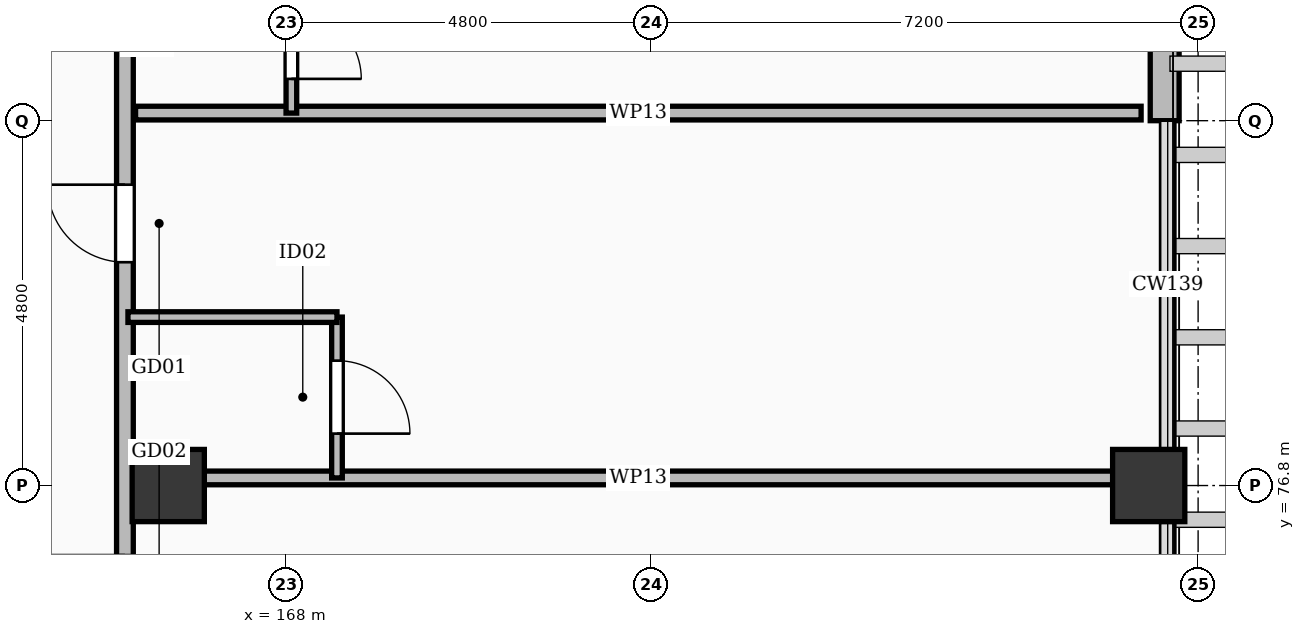
"""IFC4 building model, lengths in metres.
Left out: names, types, materials, properties, quantities, classifications, styles, units other than length and angle.
Written with IfcOpenShell. Run it as: python <this file> out.ifc"""

import sys

from ifc_helpers import new_model, si_unit, direction, frame, frame_2d, origin, origin_2d, place, context, subcontext, project, spatial, rectangle, extrude, element, fill, save


model = new_model("IFC4")
c1 = context("Model", 3, precision=1e-05, world=origin(), true_north=direction((0.0, 1.0)))
c2 = subcontext(c1, "Body", "Model", "MODEL_VIEW")
j1 = project(units=[si_unit("LENGTHUNIT", "METRE"), si_unit("PLANEANGLEUNIT", "RADIAN")], contexts=[c1])
p1 = place(None, origin())
s1 = spatial("IfcSite", under=j1, at=p1, CompositionType="ELEMENT")
p2 = place(p1, origin())
s2 = spatial("IfcBuilding", under=s1, at=p2, CompositionType="ELEMENT")
p3 = place(p2, frame((0.0, 0.0, 11.4)))
s3 = spatial("IfcBuildingStorey", under=s2, at=p3, CompositionType="ELEMENT", Elevation=11.4)
for number, where, z_axis, x_axis in (
    (1, (166.45, 76.8, 0.0), (0.0, 0.0, 1.0), (1.0, 0.0, 0.0)),
    (2, (179.35, 76.8, 0.0), (0.0, 0.0, 1.0), (1.0, 0.0, 0.0)),
):
    element("IfcColumn", number, at=place(p3, frame(where, z_axis=z_axis, x_axis=x_axis)), inside=s3, PredefinedType="COLUMN", context=c2, shape_type="SweptSolid", body=[
        extrude(rectangle(XDim=0.95, YDim=0.95, at=origin_2d()), origin(), (0.0, 0.0, 1.0), 4.8),
    ])
p4 = place(p3, frame((179.56, 85.95, 0.0), z_axis=(0.0, 0.0, 1.0), x_axis=(0.0, -1.0, 0.0)))
e3 = element("IfcWall", 3, at=p4, inside=s3, PredefinedType="SOLIDWALL", context=c2, shape_type="SweptSolid", body=[
    extrude(rectangle(XDim=4.35, YDim=0.38, at=frame_2d((2.175, 0.0))), origin(), (0.0, 0.0, 1.0), 3.662),
])
p5 = place(p4, frame((1.54, 0.0, 0.55)))
e4 = element("IfcOpeningElement", 4, at=p5, cuts=e3, PredefinedType="OPENING", context=c2, shape_type="SweptSolid", body=[
    extrude(rectangle(XDim=1.2, YDim=1.72, at=frame_2d((0.6, 0.86))), frame((0.0, 0.202, 0.0), z_axis=(0.0, -1.0, 0.0), x_axis=(1.0, 0.0, 0.0)), (0.0, 0.0, 1.0), 0.404),
])
p6 = place(p3, frame((165.88, 65.4, 0.0), z_axis=(0.0, 0.0, 1.0), x_axis=(0.0, 1.0, 0.0)))
e5 = element("IfcWall", 5, at=p6, inside=s3, PredefinedType="PARTITIONING", context=c2, shape_type="SweptSolid", body=[
    extrude(rectangle(XDim=60.25, YDim=0.22, at=frame_2d((30.125, 0.0))), origin(), (0.0, 0.0, 1.0), 3.662),
])
p7 = place(p6, frame((4.738, 0.0, 0.0)))
e6 = element("IfcOpeningElement", 6, at=p7, cuts=e5, PredefinedType="OPENING", context=c2, shape_type="SweptSolid", body=[
    extrude(rectangle(XDim=1.05, YDim=2.18, at=frame_2d((0.525, 1.09))), frame((0.0, 0.122, 0.0), z_axis=(0.0, -1.0, 0.0), x_axis=(1.0, 0.0, 0.0)), (0.0, 0.0, 1.0), 0.244),
])
p8 = place(p6, frame((9.405, 0.0, 0.0)))
e7 = element("IfcOpeningElement", 7, at=p8, cuts=e5, PredefinedType="OPENING", context=c2, shape_type="SweptSolid", body=[
    extrude(rectangle(XDim=1.08, YDim=2.25, at=frame_2d((0.54, 1.125))), frame((0.0, 0.122, 0.0), z_axis=(0.0, -1.0, 0.0), x_axis=(1.0, 0.0, 0.0)), (0.0, 0.0, 1.0), 0.244),
])
p9 = place(p6, frame((14.338, 0.0, 0.0)))
e8 = element("IfcOpeningElement", 8, at=p9, cuts=e5, PredefinedType="OPENING", context=c2, shape_type="SweptSolid", body=[
    extrude(rectangle(XDim=1.02, YDim=2.2, at=frame_2d((0.51, 1.1))), frame((0.0, 0.122, 0.0), z_axis=(0.0, -1.0, 0.0), x_axis=(1.0, 0.0, 0.0)), (0.0, 0.0, 1.0), 0.244),
])
p10 = place(p6, frame((18.655, 0.0, 0.0)))
e9 = element("IfcOpeningElement", 9, at=p10, cuts=e5, PredefinedType="OPENING", context=c2, shape_type="SweptSolid", body=[
    extrude(rectangle(XDim=1.5, YDim=2.3, at=frame_2d((0.75, 1.15))), frame((0.0, 0.122, 0.0), z_axis=(0.0, -1.0, 0.0), x_axis=(1.0, 0.0, 0.0)), (0.0, 0.0, 1.0), 0.244),
])
p11 = place(p6, frame((23.938, 0.0, 0.0)))
e10 = element("IfcOpeningElement", 10, at=p11, cuts=e5, PredefinedType="OPENING", context=c2, shape_type="SweptSolid", body=[
    extrude(rectangle(XDim=1.12, YDim=2.15, at=frame_2d((0.56, 1.075))), frame((0.0, 0.122, 0.0), z_axis=(0.0, -1.0, 0.0), x_axis=(1.0, 0.0, 0.0)), (0.0, 0.0, 1.0), 0.244),
])
p12 = place(p6, frame((28.605, 0.0, 0.0)))
e11 = element("IfcOpeningElement", 11, at=p12, cuts=e5, PredefinedType="OPENING", context=c2, shape_type="SweptSolid", body=[
    extrude(rectangle(XDim=1.28, YDim=2.16, at=frame_2d((0.64, 1.08))), frame((0.0, 0.122, 0.0), z_axis=(0.0, -1.0, 0.0), x_axis=(1.0, 0.0, 0.0)), (0.0, 0.0, 1.0), 0.244),
])
p13 = place(p6, frame((33.538, 0.0, 0.0)))
e12 = element("IfcOpeningElement", 12, at=p13, cuts=e5, PredefinedType="OPENING", context=c2, shape_type="SweptSolid", body=[
    extrude(rectangle(XDim=1.05, YDim=2.18, at=frame_2d((0.525, 1.09))), frame((0.0, 0.122, 0.0), z_axis=(0.0, -1.0, 0.0), x_axis=(1.0, 0.0, 0.0)), (0.0, 0.0, 1.0), 0.244),
])
p14 = place(p6, frame((38.205, 0.0, 0.0)))
e13 = element("IfcOpeningElement", 13, at=p14, cuts=e5, PredefinedType="OPENING", context=c2, shape_type="SweptSolid", body=[
    extrude(rectangle(XDim=1.08, YDim=2.25, at=frame_2d((0.54, 1.125))), frame((0.0, 0.122, 0.0), z_axis=(0.0, -1.0, 0.0), x_axis=(1.0, 0.0, 0.0)), (0.0, 0.0, 1.0), 0.244),
])
p15 = place(p6, frame((43.138, 0.0, 0.0)))
e14 = element("IfcOpeningElement", 14, at=p15, cuts=e5, PredefinedType="OPENING", context=c2, shape_type="SweptSolid", body=[
    extrude(rectangle(XDim=1.02, YDim=2.2, at=frame_2d((0.51, 1.1))), frame((0.0, 0.122, 0.0), z_axis=(0.0, -1.0, 0.0), x_axis=(1.0, 0.0, 0.0)), (0.0, 0.0, 1.0), 0.244),
])
p16 = place(p6, frame((47.455, 0.0, 0.0)))
e15 = element("IfcOpeningElement", 15, at=p16, cuts=e5, PredefinedType="OPENING", context=c2, shape_type="SweptSolid", body=[
    extrude(rectangle(XDim=1.5, YDim=2.3, at=frame_2d((0.75, 1.15))), frame((0.0, 0.122, 0.0), z_axis=(0.0, -1.0, 0.0), x_axis=(1.0, 0.0, 0.0)), (0.0, 0.0, 1.0), 0.244),
])
p17 = place(p6, frame((52.738, 0.0, 0.0)))
e16 = element("IfcOpeningElement", 16, at=p17, cuts=e5, PredefinedType="OPENING", context=c2, shape_type="SweptSolid", body=[
    extrude(rectangle(XDim=1.12, YDim=2.15, at=frame_2d((0.56, 1.075))), frame((0.0, 0.122, 0.0), z_axis=(0.0, -1.0, 0.0), x_axis=(1.0, 0.0, 0.0)), (0.0, 0.0, 1.0), 0.244),
])
p18 = place(p6, frame((57.405, 0.0, 0.0)))
e17 = element("IfcOpeningElement", 17, at=p18, cuts=e5, PredefinedType="OPENING", context=c2, shape_type="SweptSolid", body=[
    extrude(rectangle(XDim=1.28, YDim=2.16, at=frame_2d((0.64, 1.08))), frame((0.0, 0.122, 0.0), z_axis=(0.0, -1.0, 0.0), x_axis=(1.0, 0.0, 0.0)), (0.0, 0.0, 1.0), 0.244),
])
p19 = place(p3, frame((166.02, 76.9, 0.0), z_axis=(0.0, 0.0, 1.0), x_axis=(1.0, 0.0, 0.0)))
e18 = element("IfcWall", 18, at=p19, inside=s3, PredefinedType="PARTITIONING", context=c2, shape_type="SweptSolid", body=[
    extrude(rectangle(XDim=13.23, YDim=0.18, at=frame_2d((6.615, 0.0))), origin(), (0.0, 0.0, 1.0), 3.662),
])
p20 = place(p3, frame((168.67, 76.9, 0.0), z_axis=(0.0, 0.0, 1.0), x_axis=(0.0, 1.0, 0.0)))
e19 = element("IfcWall", 19, at=p20, inside=s3, PredefinedType="PARTITIONING", context=c2, shape_type="SweptSolid", body=[
    extrude(rectangle(XDim=2.116, YDim=0.14, at=frame_2d((1.058, 0.0))), origin(), (0.0, 0.0, 1.0), 3.692),
])
p21 = place(p20, frame((0.583, 0.0, 0.0)))
e20 = element("IfcOpeningElement", 20, at=p21, cuts=e19, PredefinedType="OPENING", context=c2, shape_type="SweptSolid", body=[
    extrude(rectangle(XDim=0.96, YDim=2.12, at=frame_2d((0.48, 1.06))), frame((0.0, 0.082, 0.0), z_axis=(0.0, -1.0, 0.0), x_axis=(1.0, 0.0, 0.0)), (0.0, 0.0, 1.0), 0.164),
])
p22 = place(p3, frame((165.92, 79.016, 0.0), z_axis=(0.0, 0.0, 1.0), x_axis=(1.0, 0.0, 0.0)))
e21 = element("IfcWall", 21, at=p22, inside=s3, PredefinedType="PARTITIONING", context=c2, shape_type="SweptSolid", body=[
    extrude(rectangle(XDim=2.75, YDim=0.14, at=frame_2d((1.375, 0.0))), origin(), (0.0, 0.0, 1.0), 3.692),
])
p23 = place(p3, frame((166.02, 81.7, 0.0), z_axis=(0.0, 0.0, 1.0), x_axis=(1.0, 0.0, 0.0)))
e22 = element("IfcWall", 22, at=p23, inside=s3, PredefinedType="PARTITIONING", context=c2, shape_type="SweptSolid", body=[
    extrude(rectangle(XDim=13.23, YDim=0.18, at=frame_2d((6.615, 0.0))), origin(), (0.0, 0.0, 1.0), 3.662),
])
p24 = place(p3, frame((168.07, 81.7, 0.0), z_axis=(0.0, 0.0, 1.0), x_axis=(0.0, 1.0, 0.0)))
e23 = element("IfcWall", 23, at=p24, inside=s3, PredefinedType="PARTITIONING", context=c2, shape_type="SweptSolid", body=[
    extrude(rectangle(XDim=1.85, YDim=0.14, at=frame_2d((0.925, 0.0))), origin(), (0.0, 0.0, 1.0), 4.42),
])
p25 = place(p24, frame((0.45, 0.0, 0.0)))
e24 = element("IfcOpeningElement", 24, at=p25, cuts=e23, PredefinedType="OPENING", context=c2, shape_type="SweptSolid", body=[
    extrude(rectangle(XDim=0.92, YDim=2.1, at=frame_2d((0.46, 1.05))), frame((0.0, 0.082, 0.0), z_axis=(0.0, -1.0, 0.0), x_axis=(1.0, 0.0, 0.0)), (0.0, 0.0, 1.0), 0.164),
])
p26 = place(p9, origin())
e25 = element("IfcDoor", 25, at=p26, inside=s3, OperationType="SINGLE_SWING_RIGHT", PredefinedType="DOOR", context=c2, shape_type="SweptSolid", body=[
    extrude(rectangle(XDim=1.02, YDim=2.2, at=frame_2d((0.51, 1.1))), frame((0.0, 0.025, 0.0), z_axis=(0.0, -1.0, 0.0), x_axis=(1.0, 0.0, 0.0)), (0.0, 0.0, 1.0), 0.05),
])
fill(e8, e25)
p27 = place(p21, frame((0.96, 0.0, 0.0), z_axis=(0.0, 0.0, 1.0), x_axis=(-1.0, 0.0, 0.0)))
e26 = element("IfcDoor", 26, at=p27, inside=s3, OperationType="SINGLE_SWING_LEFT", PredefinedType="DOOR", context=c2, shape_type="SweptSolid", body=[
    extrude(rectangle(XDim=0.96, YDim=2.12, at=frame_2d((0.48, 1.06))), frame((0.0, 0.025, 0.0), z_axis=(0.0, -1.0, 0.0), x_axis=(1.0, 0.0, 0.0)), (0.0, 0.0, 1.0), 0.05),
])
fill(e20, e26)
p28 = place(p25, frame((0.92, 0.0, 0.0), z_axis=(0.0, 0.0, 1.0), x_axis=(-1.0, 0.0, 0.0)))
e27 = element("IfcDoor", 27, at=p28, inside=s3, OperationType="SINGLE_SWING_LEFT", PredefinedType="DOOR", context=c2, shape_type="SweptSolid", body=[
    extrude(rectangle(XDim=0.92, YDim=2.1, at=frame_2d((0.46, 1.05))), frame((0.0, 0.025, 0.0), z_axis=(0.0, -1.0, 0.0), x_axis=(1.0, 0.0, 0.0)), (0.0, 0.0, 1.0), 0.05),
])
fill(e24, e27)
save(model, sys.argv[1])
